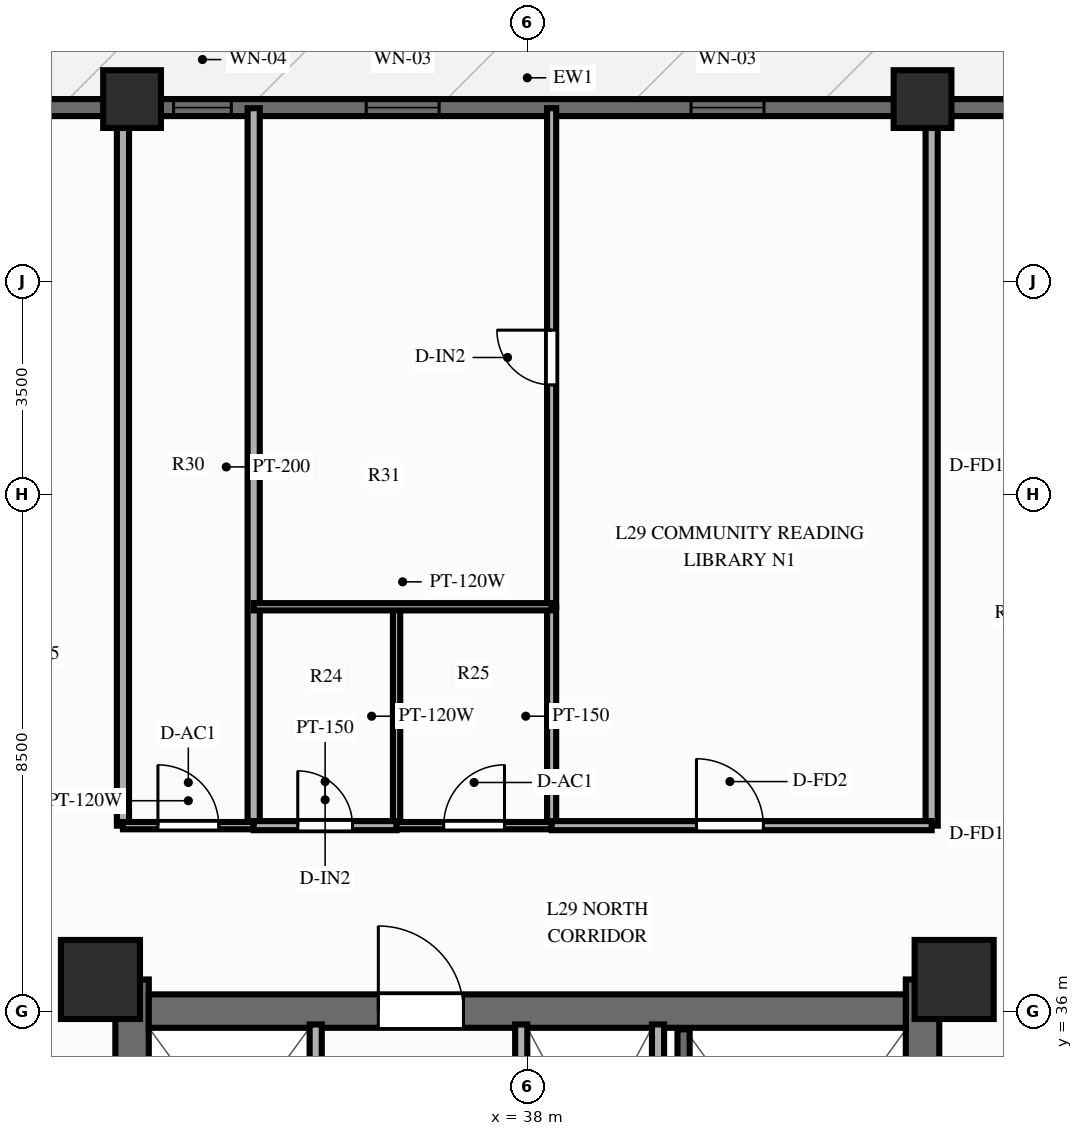
"""IFC4 building model, lengths in metres.
Left out: names, types, materials, properties, quantities, classifications, styles, units other than length and angle.
Written with IfcOpenShell. Run it as: python <this file> out.ifc"""

import sys

from ifc_helpers import new_model, si_unit, direction, frame, frame_2d, origin, origin_2d, place, context, subcontext, project, spatial, rectangle, extrude, source, transform, mapped, element, fill, save


model = new_model("IFC4")
c1 = context("Model", 3, precision=1e-05, world=origin(), true_north=direction((0.0, 1.0)))
c2 = subcontext(c1, "Body", "Model", "MODEL_VIEW")
j1 = project(units=[si_unit("LENGTHUNIT", "METRE"), si_unit("PLANEANGLEUNIT", "RADIAN")], contexts=[c1])
p1 = place(None, origin())
s1 = spatial("IfcSite", under=j1, at=p1, CompositionType="ELEMENT")
p2 = place(p1, origin())
s2 = spatial("IfcBuilding", under=s1, at=p2, CompositionType="ELEMENT")
p3 = place(p2, frame((0.0, 0.0, 92.85)))
s3 = spatial("IfcBuildingStorey", under=s2, at=p3, CompositionType="ELEMENT", Elevation=92.85)
p4 = place(p3, frame((31.5, 17.48, 0.0), z_axis=(0.0, 0.0, 1.0), x_axis=(0.0, 1.0, 0.0)))
e1 = element("IfcWall", 1, at=p4, inside=s3, PredefinedType="SHEAR", context=c2, shape_type="SweptSolid", body=[
    extrude(rectangle(XDim=19.04, YDim=0.55, at=frame_2d((9.52, 0.0))), origin(), (0.0, 0.0, 1.0), 3.0),
])
p5 = place(p4, frame((6.32, 0.0, 0.0)))
e2 = element("IfcOpeningElement", 2, at=p5, cuts=e1, PredefinedType="OPENING", context=c2, shape_type="SweptSolid", body=[
    extrude(rectangle(XDim=1.1, YDim=2.15, at=frame_2d((0.55, 1.075))), frame((0.0, 0.287, 0.0), z_axis=(0.0, -1.0, 0.0), x_axis=(1.0, 0.0, 0.0)), (0.0, 0.0, 1.0), 0.574),
])
p6 = place(p3, frame((44.5, 17.48, 0.0), z_axis=(0.0, 0.0, 1.0), x_axis=(0.0, 1.0, 0.0)))
e3 = element("IfcWall", 3, at=p6, inside=s3, PredefinedType="SHEAR", context=c2, shape_type="SweptSolid", body=[
    extrude(rectangle(XDim=19.04, YDim=0.55, at=frame_2d((9.52, 0.0))), origin(), (0.0, 0.0, 1.0), 3.0),
])
p7 = place(p6, frame((12.67, 0.0, 0.0), z_axis=(0.0, 0.0, 1.0), x_axis=(-1.0, 0.0, 0.0)))
e4 = element("IfcOpeningElement", 4, at=p7, cuts=e3, PredefinedType="OPENING", context=c2, shape_type="SweptSolid", body=[
    extrude(rectangle(XDim=1.1, YDim=2.15, at=frame_2d((0.55, 1.075))), frame((0.0, 0.287, 0.0), z_axis=(0.0, -1.0, 0.0), x_axis=(1.0, 0.0, 0.0)), (0.0, 0.0, 1.0), 0.574),
])
p8 = place(p3, frame((31.775, 36.0, 0.0), z_axis=(0.0, 0.0, 1.0), x_axis=(1.0, 0.0, 0.0)))
e5 = element("IfcWall", 5, at=p8, inside=s3, PredefinedType="SHEAR", context=c2, shape_type="SweptSolid", body=[
    extrude(rectangle(XDim=12.45, YDim=0.55, at=frame_2d((6.225, 0.0))), origin(), (0.0, 0.0, 1.0), 3.0),
])
p9 = place(p8, frame((5.175, 0.0, 0.0), z_axis=(0.0, 0.0, 1.0), x_axis=(-1.0, 0.0, 0.0)))
e6 = element("IfcOpeningElement", 6, at=p9, cuts=e5, PredefinedType="OPENING", context=c2, shape_type="SweptSolid", body=[
    extrude(rectangle(XDim=1.4, YDim=2.15, at=frame_2d((0.7, 1.075))), frame((0.0, 0.287, 0.0), z_axis=(0.0, -1.0, 0.0), x_axis=(1.0, 0.0, 0.0)), (0.0, 0.0, 1.0), 0.574),
])
m1 = source(origin(), c2, "Body", "SweptSolid", [
    extrude(rectangle(XDim=1.3, YDim=1.3, at=origin_2d()), origin(), (0.0, 0.0, 1.0), 3.0),
])
for number, where, z_axis, x_axis in (
    (7, (30.98, 36.52, 0.0), (0.0, 0.0, 1.0), (1.0, 0.0, 0.0)),
    (8, (45.02, 36.52, 0.0), (0.0, 0.0, 1.0), (1.0, 0.0, 0.0)),
):
    element("IfcColumn", number, at=place(p3, frame(where, z_axis=z_axis, x_axis=x_axis)), inside=s3, PredefinedType="COLUMN", context=c2, shape_type="MappedRepresentation", body=[
        mapped(m1, transform((0.0, 0.0, 0.0), scale=1.0)),
    ])
m2 = source(origin(), c2, "Body", "SweptSolid", [
    extrude(rectangle(XDim=0.95, YDim=0.95, at=origin_2d()), origin(), (0.0, 0.0, 1.0), 3.0),
])
for number, where, z_axis, x_axis in (
    (9, (44.5, 51.0, 0.0), (0.0, 0.0, 1.0), (1.0, 0.0, 0.0)),
    (10, (31.5, 51.0, 0.0), (0.0, 0.0, 1.0), (1.0, 0.0, 0.0)),
):
    element("IfcColumn", number, at=place(p3, frame(where, z_axis=z_axis, x_axis=x_axis)), inside=s3, PredefinedType="COLUMN", context=c2, shape_type="MappedRepresentation", body=[
        mapped(m2, transform((0.0, 0.0, 0.0), scale=1.0)),
    ])
p10 = place(p3, frame((16.2, 50.86, 0.0), z_axis=(0.0, 0.0, 1.0), x_axis=(1.0, 0.0, 0.0)))
e11 = element("IfcWall", 11, at=p10, inside=s3, PredefinedType="SOLIDWALL", context=c2, shape_type="SweptSolid", body=[
    extrude(rectangle(XDim=43.6, YDim=0.28, at=frame_2d((21.8, 0.0))), origin(), (0.0, 0.0, 1.0), 2.28),
])
p11 = place(p10, frame((7.1, 0.0, 0.0)))
e12 = element("IfcOpeningElement", 12, at=p11, cuts=e11, PredefinedType="OPENING", context=c2, shape_type="SweptSolid", body=[
    extrude(rectangle(XDim=1.1, YDim=2.15, at=frame_2d((0.55, 1.075))), frame((0.0, 0.152, 0.0), z_axis=(0.0, -1.0, 0.0), x_axis=(1.0, 0.0, 0.0)), (0.0, 0.0, 1.0), 0.304),
])
p12 = place(p10, frame((15.982, 0.0, 0.25)))
e13 = element("IfcOpeningElement", 13, at=p12, cuts=e11, PredefinedType="OPENING", context=c2, shape_type="SweptSolid", body=[
    extrude(rectangle(XDim=0.95, YDim=1.5, at=frame_2d((0.475, 0.75))), frame((0.0, 0.152, 0.0), z_axis=(0.0, -1.0, 0.0), x_axis=(1.0, 0.0, 0.0)), (0.0, 0.0, 1.0), 0.304),
])
p13 = place(p10, frame((19.15, 0.0, 0.25)))
e14 = element("IfcOpeningElement", 14, at=p13, cuts=e11, PredefinedType="OPENING", context=c2, shape_type="SweptSolid", body=[
    extrude(rectangle(XDim=1.2, YDim=1.5, at=frame_2d((0.6, 0.75))), frame((0.0, 0.152, 0.0), z_axis=(0.0, -1.0, 0.0), x_axis=(1.0, 0.0, 0.0)), (0.0, 0.0, 1.0), 0.304),
])
p14 = place(p10, frame((24.492, 0.0, 0.25)))
e15 = element("IfcOpeningElement", 15, at=p14, cuts=e11, PredefinedType="OPENING", context=c2, shape_type="SweptSolid", body=[
    extrude(rectangle(XDim=1.2, YDim=1.5, at=frame_2d((0.6, 0.75))), frame((0.0, 0.152, 0.0), z_axis=(0.0, -1.0, 0.0), x_axis=(1.0, 0.0, 0.0)), (0.0, 0.0, 1.0), 0.304),
])
p15 = place(p10, frame((35.35, 0.0, 0.25)))
e16 = element("IfcOpeningElement", 16, at=p15, cuts=e11, PredefinedType="OPENING", context=c2, shape_type="SweptSolid", body=[
    extrude(rectangle(XDim=1.2, YDim=1.5, at=frame_2d((0.6, 0.75))), frame((0.0, 0.152, 0.0), z_axis=(0.0, -1.0, 0.0), x_axis=(1.0, 0.0, 0.0)), (0.0, 0.0, 1.0), 0.304),
])
p16 = place(p3, frame((40.15, 31.8, 0.0), z_axis=(0.0, 0.0, 1.0), x_axis=(0.0, 1.0, 0.0)))
e17 = element("IfcWall", 17, at=p16, inside=s3, PredefinedType="PARTITIONING", context=c2, shape_type="SweptSolid", body=[
    extrude(rectangle(XDim=3.98, YDim=0.2, at=frame_2d((1.99, 0.0))), origin(), (0.0, 0.0, 1.0), 2.79),
])
p17 = place(p3, frame((40.57, 28.65, 0.0), z_axis=(0.0, 0.0, 1.0), x_axis=(0.0, 1.0, 0.0)))
e18 = element("IfcWall", 18, at=p17, inside=s3, PredefinedType="SOLIDWALL", context=c2, shape_type="SweptSolid", body=[
    extrude(rectangle(XDim=7.05, YDim=0.2, at=frame_2d((3.525, 0.0))), origin(), (0.0, 0.0, 1.0), 2.79),
])
p18 = place(p3, frame((34.52, 25.44, 0.0), z_axis=(0.0, 0.0, 1.0), x_axis=(0.0, 1.0, 0.0)))
e19 = element("IfcWall", 19, at=p18, inside=s3, PredefinedType="PARTITIONING", context=c2, shape_type="SweptSolid", body=[
    extrude(rectangle(XDim=10.34, YDim=0.2, at=frame_2d((5.17, 0.0))), origin(), (0.0, 0.0, 1.0), 2.79),
])
p19 = place(p18, frame((2.6, 0.0, 0.0)))
e20 = element("IfcOpeningElement", 20, at=p19, cuts=e19, PredefinedType="OPENING", context=c2, shape_type="SweptSolid", body=[
    extrude(rectangle(XDim=1.0, YDim=2.15, at=frame_2d((0.5, 1.075))), frame((0.0, 0.112, 0.0), z_axis=(0.0, -1.0, 0.0), x_axis=(1.0, 0.0, 0.0)), (0.0, 0.0, 1.0), 0.224),
])
p20 = place(p3, frame((37.9, 25.44, 0.0), z_axis=(0.0, 0.0, 1.0), x_axis=(0.0, 1.0, 0.0)))
e21 = element("IfcWall", 21, at=p20, inside=s3, PredefinedType="PARTITIONING", context=c2, shape_type="SweptSolid", body=[
    extrude(rectangle(XDim=10.34, YDim=0.2, at=frame_2d((5.17, 0.0))), origin(), (0.0, 0.0, 1.0), 2.79),
])
p21 = place(p20, frame((0.32, 0.0, 0.0)))
e22 = element("IfcOpeningElement", 22, at=p21, cuts=e21, PredefinedType="OPENING", context=c2, shape_type="SweptSolid", body=[
    extrude(rectangle(XDim=1.0, YDim=2.15, at=frame_2d((0.5, 1.075))), frame((0.0, 0.112, 0.0), z_axis=(0.0, -1.0, 0.0), x_axis=(1.0, 0.0, 0.0)), (0.0, 0.0, 1.0), 0.224),
])
p22 = place(p20, frame((1.71, 0.0, 0.0)))
e23 = element("IfcOpeningElement", 23, at=p22, cuts=e21, PredefinedType="OPENING", context=c2, shape_type="SweptSolid", body=[
    extrude(rectangle(XDim=1.0, YDim=2.15, at=frame_2d((0.5, 1.075))), frame((0.0, 0.112, 0.0), z_axis=(0.0, -1.0, 0.0), x_axis=(1.0, 0.0, 0.0)), (0.0, 0.0, 1.0), 0.224),
])
p23 = place(p20, frame((3.51, 0.0, 0.0)))
e24 = element("IfcOpeningElement", 24, at=p23, cuts=e21, PredefinedType="OPENING", context=c2, shape_type="SweptSolid", body=[
    extrude(rectangle(XDim=1.0, YDim=2.15, at=frame_2d((0.5, 1.075))), frame((0.0, 0.112, 0.0), z_axis=(0.0, -1.0, 0.0), x_axis=(1.0, 0.0, 0.0)), (0.0, 0.0, 1.0), 0.224),
])
p24 = place(p20, frame((5.01, 0.0, 0.0)))
e25 = element("IfcOpeningElement", 25, at=p24, cuts=e21, PredefinedType="OPENING", context=c2, shape_type="SweptSolid", body=[
    extrude(rectangle(XDim=1.0, YDim=2.15, at=frame_2d((0.5, 1.075))), frame((0.0, 0.112, 0.0), z_axis=(0.0, -1.0, 0.0), x_axis=(1.0, 0.0, 0.0)), (0.0, 0.0, 1.0), 0.224),
])
for number, where, z_axis, x_axis in (
    (26, (31.35, 39.05, 0.0), (0.0, 0.0, 1.0), (0.0, 1.0, 0.0)),
    (27, (44.65, 39.05, 0.0), (0.0, 0.0, 1.0), (0.0, 1.0, 0.0)),
):
    element("IfcWall", number, at=place(p3, frame(where, z_axis=z_axis, x_axis=x_axis)), inside=s3, PredefinedType="PARTITIONING", context=c2, shape_type="SweptSolid", body=[
        extrude(rectangle(XDim=11.8, YDim=0.2, at=frame_2d((5.9, 0.0))), origin(), (0.0, 0.0, 1.0), 2.34),
    ])
p25 = place(p3, frame((33.5, 39.05, 0.0), z_axis=(0.0, 0.0, 1.0), x_axis=(0.0, 1.0, 0.0)))
e28 = element("IfcWall", 28, at=p25, inside=s3, PredefinedType="PARTITIONING", context=c2, shape_type="SweptSolid", body=[
    extrude(rectangle(XDim=11.8, YDim=0.2, at=frame_2d((5.9, 0.0))), origin(), (0.0, 0.0, 1.0), 2.79),
])
p26 = place(p3, frame((31.35, 39.05, 0.0), z_axis=(0.0, 0.0, 1.0), x_axis=(1.0, 0.0, 0.0)))
e29 = element("IfcWall", 29, at=p26, inside=s3, PredefinedType="PARTITIONING", context=c2, shape_type="SweptSolid", body=[
    extrude(rectangle(XDim=2.15, YDim=0.12, at=frame_2d((1.075, 0.0))), origin(), (0.0, 0.0, 1.0), 2.79),
])
p27 = place(p26, frame((0.575, 0.0, 0.0)))
e30 = element("IfcOpeningElement", 30, at=p27, cuts=e29, PredefinedType="OPENING", context=c2, shape_type="SweptSolid", body=[
    extrude(rectangle(XDim=1.0, YDim=2.1, at=frame_2d((0.5, 1.05))), frame((0.0, 0.072, 0.0), z_axis=(0.0, -1.0, 0.0), x_axis=(1.0, 0.0, 0.0)), (0.0, 0.0, 1.0), 0.144),
])
p28 = place(p3, frame((35.85, 39.05, 0.0), z_axis=(0.0, 0.0, 1.0), x_axis=(0.0, 1.0, 0.0)))
e31 = element("IfcWall", 31, at=p28, inside=s3, PredefinedType="PARTITIONING", context=c2, shape_type="SweptSolid", body=[
    extrude(rectangle(XDim=3.6, YDim=0.12, at=frame_2d((1.8, 0.0))), origin(), (0.0, 0.0, 1.0), 2.79),
])
p29 = place(p3, frame((38.4, 39.05, 0.0), z_axis=(0.0, 0.0, 1.0), x_axis=(0.0, 1.0, 0.0)))
e32 = element("IfcWall", 32, at=p29, inside=s3, PredefinedType="PARTITIONING", context=c2, shape_type="SweptSolid", body=[
    extrude(rectangle(XDim=3.6, YDim=0.15, at=frame_2d((1.8, 0.0))), origin(), (0.0, 0.0, 1.0), 2.79),
])
p30 = place(p3, frame((38.4, 42.65, 0.0), z_axis=(0.0, 0.0, 1.0), x_axis=(0.0, 1.0, 0.0)))
e33 = element("IfcWall", 33, at=p30, inside=s3, PredefinedType="PARTITIONING", context=c2, shape_type="SweptSolid", body=[
    extrude(rectangle(XDim=8.2, YDim=0.15, at=frame_2d((4.1, 0.0))), origin(), (0.0, 0.0, 1.0), 2.79),
])
p31 = place(p30, frame((3.65, 0.0, 0.0)))
e34 = element("IfcOpeningElement", 34, at=p31, cuts=e33, PredefinedType="OPENING", context=c2, shape_type="SweptSolid", body=[
    extrude(rectangle(XDim=0.9, YDim=2.1, at=frame_2d((0.45, 1.05))), frame((0.0, 0.087, 0.0), z_axis=(0.0, -1.0, 0.0), x_axis=(1.0, 0.0, 0.0)), (0.0, 0.0, 1.0), 0.174),
])
p32 = place(p3, frame((33.5, 42.65, 0.0), z_axis=(0.0, 0.0, 1.0), x_axis=(1.0, 0.0, 0.0)))
e35 = element("IfcWall", 35, at=p32, inside=s3, PredefinedType="PARTITIONING", context=c2, shape_type="SweptSolid", body=[
    extrude(rectangle(XDim=4.9, YDim=0.12, at=frame_2d((2.45, 0.0))), origin(), (0.0, 0.0, 1.0), 2.79),
])
p33 = place(p3, frame((33.5, 39.05, 0.0), z_axis=(0.0, 0.0, 1.0), x_axis=(1.0, 0.0, 0.0)))
e36 = element("IfcWall", 36, at=p33, inside=s3, PredefinedType="PARTITIONING", context=c2, shape_type="SweptSolid", body=[
    extrude(rectangle(XDim=2.35, YDim=0.15, at=frame_2d((1.175, 0.0))), origin(), (0.0, 0.0, 1.0), 2.79),
])
p34 = place(p33, frame((0.725, 0.0, 0.0)))
e37 = element("IfcOpeningElement", 37, at=p34, cuts=e36, PredefinedType="OPENING", context=c2, shape_type="SweptSolid", body=[
    extrude(rectangle(XDim=0.9, YDim=2.1, at=frame_2d((0.45, 1.05))), frame((0.0, 0.087, 0.0), z_axis=(0.0, -1.0, 0.0), x_axis=(1.0, 0.0, 0.0)), (0.0, 0.0, 1.0), 0.174),
])
p35 = place(p3, frame((35.85, 39.05, 0.0), z_axis=(0.0, 0.0, 1.0), x_axis=(1.0, 0.0, 0.0)))
e38 = element("IfcWall", 38, at=p35, inside=s3, PredefinedType="PARTITIONING", context=c2, shape_type="SweptSolid", body=[
    extrude(rectangle(XDim=2.55, YDim=0.12, at=frame_2d((1.275, 0.0))), origin(), (0.0, 0.0, 1.0), 2.79),
])
p36 = place(p35, frame((0.775, 0.0, 0.0)))
e39 = element("IfcOpeningElement", 39, at=p36, cuts=e38, PredefinedType="OPENING", context=c2, shape_type="SweptSolid", body=[
    extrude(rectangle(XDim=1.0, YDim=2.1, at=frame_2d((0.5, 1.05))), frame((0.0, 0.072, 0.0), z_axis=(0.0, -1.0, 0.0), x_axis=(1.0, 0.0, 0.0)), (0.0, 0.0, 1.0), 0.144),
])
p37 = place(p3, frame((38.4, 39.05, 0.0), z_axis=(0.0, 0.0, 1.0), x_axis=(1.0, 0.0, 0.0)))
e40 = element("IfcWall", 40, at=p37, inside=s3, PredefinedType="PARTITIONING", context=c2, shape_type="SweptSolid", body=[
    extrude(rectangle(XDim=6.25, YDim=0.15, at=frame_2d((3.125, 0.0))), origin(), (0.0, 0.0, 1.0), 2.79),
])
p38 = place(p37, frame((2.382, 0.0, 0.0)))
e41 = element("IfcOpeningElement", 41, at=p38, cuts=e40, PredefinedType="OPENING", context=c2, shape_type="SweptSolid", body=[
    extrude(rectangle(XDim=1.1, YDim=2.15, at=frame_2d((0.55, 1.075))), frame((0.0, 0.087, 0.0), z_axis=(0.0, -1.0, 0.0), x_axis=(1.0, 0.0, 0.0)), (0.0, 0.0, 1.0), 0.174),
])
m3 = source(origin(), c2, "Body", "SweptSolid", [
    extrude(rectangle(XDim=0.95, YDim=1.5, at=frame_2d((0.475, 0.75))), frame((0.0, 0.03, 0.0), z_axis=(0.0, -1.0, 0.0), x_axis=(1.0, 0.0, 0.0)), (0.0, 0.0, 1.0), 0.06),
])
p39 = place(p12, origin())
e42 = element("IfcWindow", 42, at=p39, inside=s3, PartitioningType="SINGLE_PANEL", PredefinedType="WINDOW", context=c2, shape_type="MappedRepresentation", body=[
    mapped(m3, transform((0.0, 0.0, 0.0), scale=1.0)),
])
fill(e13, e42)
m4 = source(origin(), c2, "Body", "SweptSolid", [
    extrude(rectangle(XDim=1.2, YDim=1.5, at=frame_2d((0.6, 0.75))), frame((0.0, 0.03, 0.0), z_axis=(0.0, -1.0, 0.0), x_axis=(1.0, 0.0, 0.0)), (0.0, 0.0, 1.0), 0.06),
])
p40 = place(p13, origin())
e43 = element("IfcWindow", 43, at=p40, inside=s3, PartitioningType="SINGLE_PANEL", PredefinedType="WINDOW", context=c2, shape_type="MappedRepresentation", body=[
    mapped(m4, transform((0.0, 0.0, 0.0), scale=1.0)),
])
fill(e14, e43)
p41 = place(p14, origin())
e44 = element("IfcWindow", 44, at=p41, inside=s3, PartitioningType="SINGLE_PANEL", PredefinedType="WINDOW", context=c2, shape_type="MappedRepresentation", body=[
    mapped(m4, transform((0.0, 0.0, 0.0), scale=1.0)),
])
fill(e15, e44)
m5 = source(origin(), c2, "Body", "SweptSolid", [
    extrude(rectangle(XDim=1.4, YDim=2.15, at=frame_2d((0.7, 1.075))), frame((0.0, 0.025, 0.0), z_axis=(0.0, -1.0, 0.0), x_axis=(1.0, 0.0, 0.0)), (0.0, 0.0, 1.0), 0.05),
])
p42 = place(p9, origin())
e45 = element("IfcDoor", 45, at=p42, inside=s3, OperationType="SINGLE_SWING_RIGHT", PredefinedType="DOOR", context=c2, shape_type="MappedRepresentation", body=[
    mapped(m5, transform((0.0, 0.0, 0.0), scale=1.0)),
])
fill(e6, e45)
m6 = source(origin(), c2, "Body", "SweptSolid", [
    extrude(rectangle(XDim=1.0, YDim=2.1, at=frame_2d((0.5, 1.05))), frame((0.0, 0.025, 0.0), z_axis=(0.0, -1.0, 0.0), x_axis=(1.0, 0.0, 0.0)), (0.0, 0.0, 1.0), 0.05),
])
p43 = place(p27, origin())
e46 = element("IfcDoor", 46, at=p43, inside=s3, OperationType="SINGLE_SWING_LEFT", PredefinedType="DOOR", context=c2, shape_type="MappedRepresentation", body=[
    mapped(m6, transform((0.0, 0.0, 0.0), scale=1.0)),
])
fill(e30, e46)
m7 = source(origin(), c2, "Body", "SweptSolid", [
    extrude(rectangle(XDim=0.9, YDim=2.1, at=frame_2d((0.45, 1.05))), frame((0.0, 0.025, 0.0), z_axis=(0.0, -1.0, 0.0), x_axis=(1.0, 0.0, 0.0)), (0.0, 0.0, 1.0), 0.05),
])
p44 = place(p31, origin())
e47 = element("IfcDoor", 47, at=p44, inside=s3, OperationType="SINGLE_SWING_RIGHT", PredefinedType="DOOR", context=c2, shape_type="MappedRepresentation", body=[
    mapped(m7, transform((0.0, 0.0, 0.0), scale=1.0)),
])
fill(e34, e47)
p45 = place(p34, origin())
e48 = element("IfcDoor", 48, at=p45, inside=s3, OperationType="SINGLE_SWING_LEFT", PredefinedType="DOOR", context=c2, shape_type="MappedRepresentation", body=[
    mapped(m7, transform((0.0, 0.0, 0.0), scale=1.0)),
])
fill(e37, e48)
p46 = place(p36, origin())
e49 = element("IfcDoor", 49, at=p46, inside=s3, OperationType="SINGLE_SWING_RIGHT", PredefinedType="DOOR", context=c2, shape_type="MappedRepresentation", body=[
    mapped(m6, transform((0.0, 0.0, 0.0), scale=1.0)),
])
fill(e39, e49)
m8 = source(origin(), c2, "Body", "SweptSolid", [
    extrude(rectangle(XDim=1.1, YDim=2.15, at=frame_2d((0.55, 1.075))), frame((0.0, 0.025, 0.0), z_axis=(0.0, -1.0, 0.0), x_axis=(1.0, 0.0, 0.0)), (0.0, 0.0, 1.0), 0.05),
])
p47 = place(p38, origin())
e50 = element("IfcDoor", 50, at=p47, inside=s3, OperationType="SINGLE_SWING_LEFT", PredefinedType="DOOR", context=c2, shape_type="MappedRepresentation", body=[
    mapped(m8, transform((0.0, 0.0, 0.0), scale=1.0)),
])
fill(e41, e50)
save(model, sys.argv[1])
